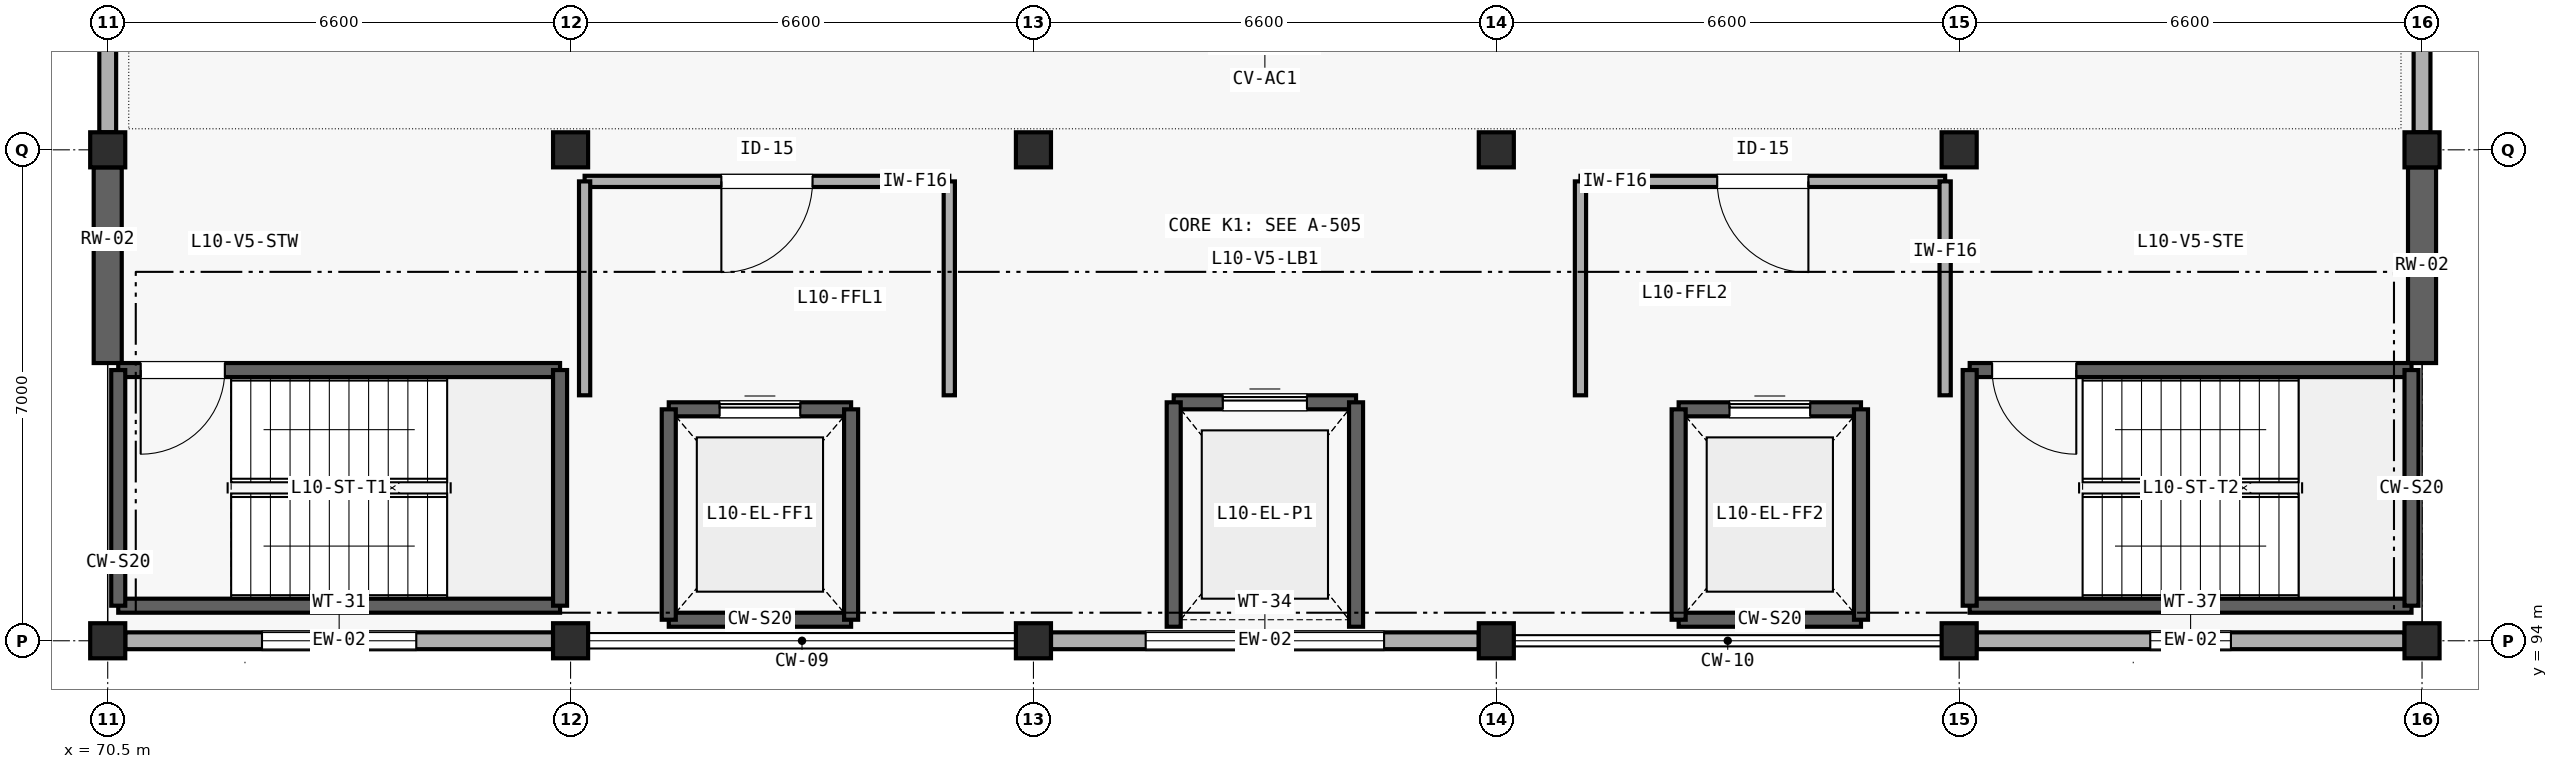
"""IFC4 building model, lengths in metres.
Left out: names, types, materials, properties, quantities, classifications, styles, units other than length and angle.
Written with IfcOpenShell. Run it as: python <this file> out.ifc"""

import sys

from ifc_helpers import new_model, si_unit, direction, frame, frame_2d, origin, origin_2d, place, context, subcontext, project, spatial, rectangle, extrude, element, fill, save


model = new_model("IFC4")
c1 = context("Model", 3, precision=1e-05, world=origin(), true_north=direction((0.0, 1.0)))
c2 = subcontext(c1, "Body", "Model", "MODEL_VIEW")
j1 = project(units=[si_unit("LENGTHUNIT", "METRE"), si_unit("PLANEANGLEUNIT", "RADIAN")], contexts=[c1])
p1 = place(None, origin())
s1 = spatial("IfcSite", under=j1, at=p1, CompositionType="ELEMENT")
p2 = place(p1, origin())
s2 = spatial("IfcBuilding", under=s1, at=p2, CompositionType="ELEMENT")
p3 = place(p2, frame((0.0, 0.0, 42.0)))
s3 = spatial("IfcBuildingStorey", under=s2, at=p3, CompositionType="ELEMENT", Elevation=42.0)
for number, where, z_axis, x_axis in (
    (1, (70.5, 94.0, 0.0), (0.0, 0.0, 1.0), (1.0, 0.0, 0.0)),
    (2, (70.5, 101.0, 0.0), (0.0, 0.0, 1.0), (1.0, 0.0, 0.0)),
    (3, (77.1, 94.0, 0.0), (0.0, 0.0, 1.0), (1.0, 0.0, 0.0)),
    (4, (77.1, 101.0, 0.0), (0.0, 0.0, 1.0), (1.0, 0.0, 0.0)),
    (5, (83.7, 94.0, 0.0), (0.0, 0.0, 1.0), (1.0, 0.0, 0.0)),
    (6, (83.7, 101.0, 0.0), (0.0, 0.0, 1.0), (1.0, 0.0, 0.0)),
    (7, (90.3, 94.0, 0.0), (0.0, 0.0, 1.0), (1.0, 0.0, 0.0)),
    (8, (90.3, 101.0, 0.0), (0.0, 0.0, 1.0), (1.0, 0.0, 0.0)),
    (9, (96.9, 94.0, 0.0), (0.0, 0.0, 1.0), (1.0, 0.0, 0.0)),
    (10, (96.9, 101.0, 0.0), (0.0, 0.0, 1.0), (1.0, 0.0, 0.0)),
    (11, (103.5, 94.0, 0.0), (0.0, 0.0, 1.0), (1.0, 0.0, 0.0)),
    (12, (103.5, 101.0, 0.0), (0.0, 0.0, 1.0), (1.0, 0.0, 0.0)),
):
    element("IfcColumn", number, at=place(p3, frame(where, z_axis=z_axis, x_axis=x_axis)), inside=s3, PredefinedType="COLUMN", context=c2, shape_type="SweptSolid", body=[
        extrude(rectangle(XDim=0.5, YDim=0.5, at=origin_2d()), origin(), (0.0, 0.0, 1.0), 4.2),
    ])
p4 = place(p3, frame((70.75, 94.0, 0.0), z_axis=(0.0, 0.0, 1.0), x_axis=(1.0, 0.0, 0.0)))
e13 = element("IfcWall", 13, at=p4, inside=s3, PredefinedType="SOLIDWALL", context=c2, shape_type="SweptSolid", body=[
    extrude(rectangle(XDim=6.1, YDim=0.24, at=frame_2d((3.05, 0.0))), origin(), (0.0, 0.0, 1.0), 3.365),
])
p5 = place(p4, frame((1.95, 0.0, 0.85)))
e14 = element("IfcOpeningElement", 14, at=p5, cuts=e13, PredefinedType="OPENING", context=c2, shape_type="SweptSolid", body=[
    extrude(rectangle(XDim=2.2, YDim=1.2, at=frame_2d((1.1, 0.6))), frame((0.0, 0.13, 0.0), z_axis=(0.0, -1.0, 0.0), x_axis=(1.0, 0.0, 0.0)), (0.0, 0.0, 1.0), 0.26),
])
p6 = place(p3, frame((83.95, 94.0, 0.0), z_axis=(0.0, 0.0, 1.0), x_axis=(1.0, 0.0, 0.0)))
e15 = element("IfcWall", 15, at=p6, inside=s3, PredefinedType="SOLIDWALL", context=c2, shape_type="SweptSolid", body=[
    extrude(rectangle(XDim=6.1, YDim=0.24, at=frame_2d((3.05, 0.0))), origin(), (0.0, 0.0, 1.0), 3.345),
])
p7 = place(p6, frame((1.35, 0.0, 0.85)))
e16 = element("IfcOpeningElement", 16, at=p7, cuts=e15, PredefinedType="OPENING", context=c2, shape_type="SweptSolid", body=[
    extrude(rectangle(XDim=3.4, YDim=1.2, at=frame_2d((1.7, 0.6))), frame((0.0, 0.13, 0.0), z_axis=(0.0, -1.0, 0.0), x_axis=(1.0, 0.0, 0.0)), (0.0, 0.0, 1.0), 0.26),
])
p8 = place(p3, frame((97.15, 94.0, 0.0), z_axis=(0.0, 0.0, 1.0), x_axis=(1.0, 0.0, 0.0)))
e17 = element("IfcWall", 17, at=p8, inside=s3, PredefinedType="SOLIDWALL", context=c2, shape_type="SweptSolid", body=[
    extrude(rectangle(XDim=6.1, YDim=0.24, at=frame_2d((3.05, 0.0))), origin(), (0.0, 0.0, 1.0), 3.135),
])
p9 = place(p8, frame((2.475, 0.0, 0.85)))
e18 = element("IfcOpeningElement", 18, at=p9, cuts=e17, PredefinedType="OPENING", context=c2, shape_type="SweptSolid", body=[
    extrude(rectangle(XDim=1.15, YDim=1.55, at=frame_2d((0.575, 0.775))), frame((0.0, 0.13, 0.0), z_axis=(0.0, -1.0, 0.0), x_axis=(1.0, 0.0, 0.0)), (0.0, 0.0, 1.0), 0.26),
])
p10 = place(p3, frame((70.5, 97.96, 0.0), z_axis=(0.0, 0.0, 1.0), x_axis=(0.0, 1.0, 0.0)))
e19 = element("IfcWall", 19, at=p10, inside=s3, PredefinedType="SHEAR", context=c2, shape_type="SweptSolid", body=[
    extrude(rectangle(XDim=2.79, YDim=0.4, at=frame_2d((1.395, 0.0))), origin(), (0.0, 0.0, 1.0), 3.85),
])
p11 = place(p3, frame((70.5, 101.25, 0.0), z_axis=(0.0, 0.0, 1.0), x_axis=(0.0, 1.0, 0.0)))
e20 = element("IfcWall", 20, at=p11, inside=s3, PredefinedType="SOLIDWALL", context=c2, shape_type="SweptSolid", body=[
    extrude(rectangle(XDim=6.5, YDim=0.24, at=frame_2d((3.25, 0.0))), origin(), (0.0, 0.0, 1.0), 3.565),
])
p12 = place(p11, frame((2.05, 0.0, 0.85)))
e21 = element("IfcOpeningElement", 21, at=p12, cuts=e20, PredefinedType="OPENING", context=c2, shape_type="SweptSolid", body=[
    extrude(rectangle(XDim=2.4, YDim=1.35, at=frame_2d((1.2, 0.675))), frame((0.0, 0.13, 0.0), z_axis=(0.0, -1.0, 0.0), x_axis=(1.0, 0.0, 0.0)), (0.0, 0.0, 1.0), 0.26),
])
p13 = place(p3, frame((103.5, 97.96, 0.0), z_axis=(0.0, 0.0, 1.0), x_axis=(0.0, 1.0, 0.0)))
e22 = element("IfcWall", 22, at=p13, inside=s3, PredefinedType="SHEAR", context=c2, shape_type="SweptSolid", body=[
    extrude(rectangle(XDim=2.79, YDim=0.4, at=frame_2d((1.395, 0.0))), origin(), (0.0, 0.0, 1.0), 3.85),
])
p14 = place(p3, frame((103.5, 101.25, 0.0), z_axis=(0.0, 0.0, 1.0), x_axis=(0.0, 1.0, 0.0)))
e23 = element("IfcWall", 23, at=p14, inside=s3, PredefinedType="SOLIDWALL", context=c2, shape_type="SweptSolid", body=[
    extrude(rectangle(XDim=6.5, YDim=0.24, at=frame_2d((3.25, 0.0))), origin(), (0.0, 0.0, 1.0), 3.505),
])
p15 = place(p14, frame((2.05, 0.0, 0.85)))
e24 = element("IfcOpeningElement", 24, at=p15, cuts=e23, PredefinedType="OPENING", context=c2, shape_type="SweptSolid", body=[
    extrude(rectangle(XDim=2.4, YDim=1.5, at=frame_2d((1.2, 0.75))), frame((0.0, 0.13, 0.0), z_axis=(0.0, -1.0, 0.0), x_axis=(1.0, 0.0, 0.0)), (0.0, 0.0, 1.0), 0.26),
])
p16 = place(p3, frame((70.65, 94.5, 0.0), z_axis=(0.0, 0.0, 1.0), x_axis=(1.0, 0.0, 0.0)))
e25 = element("IfcWall", 25, at=p16, inside=s3, PredefinedType="SHEAR", context=c2, shape_type="SweptSolid", body=[
    extrude(rectangle(XDim=6.3, YDim=0.2, at=frame_2d((3.15, 0.0))), origin(), (0.0, 0.0, 1.0), 4.2),
])
p17 = place(p3, frame((70.65, 97.86, 0.0), z_axis=(0.0, 0.0, 1.0), x_axis=(1.0, 0.0, 0.0)))
e26 = element("IfcWall", 26, at=p17, inside=s3, PredefinedType="SHEAR", context=c2, shape_type="SweptSolid", body=[
    extrude(rectangle(XDim=6.3, YDim=0.2, at=frame_2d((3.15, 0.0))), origin(), (0.0, 0.0, 1.0), 4.2),
])
p18 = place(p17, frame((0.32, 0.0, 0.0)))
e27 = element("IfcOpeningElement", 27, at=p18, cuts=e26, PredefinedType="OPENING", context=c2, shape_type="SweptSolid", body=[
    extrude(rectangle(XDim=1.2, YDim=2.15, at=frame_2d((0.6, 1.075))), frame((0.0, 0.11, 0.0), z_axis=(0.0, -1.0, 0.0), x_axis=(1.0, 0.0, 0.0)), (0.0, 0.0, 1.0), 0.22),
])
for number, where, z_axis, x_axis in (
    (28, (70.65, 94.5, 0.0), (0.0, 0.0, 1.0), (0.0, 1.0, 0.0)),
    (29, (76.95, 94.5, 0.0), (0.0, 0.0, 1.0), (0.0, 1.0, 0.0)),
):
    element("IfcWall", number, at=place(p3, frame(where, z_axis=z_axis, x_axis=x_axis)), inside=s3, PredefinedType="SHEAR", context=c2, shape_type="SweptSolid", body=[
        extrude(rectangle(XDim=3.36, YDim=0.2, at=frame_2d((1.68, 0.0))), origin(), (0.0, 0.0, 1.0), 4.2),
    ])
p19 = place(p3, frame((97.05, 94.5, 0.0), z_axis=(0.0, 0.0, 1.0), x_axis=(1.0, 0.0, 0.0)))
e30 = element("IfcWall", 30, at=p19, inside=s3, PredefinedType="SHEAR", context=c2, shape_type="SweptSolid", body=[
    extrude(rectangle(XDim=6.3, YDim=0.2, at=frame_2d((3.15, 0.0))), origin(), (0.0, 0.0, 1.0), 4.2),
])
p20 = place(p3, frame((97.05, 97.86, 0.0), z_axis=(0.0, 0.0, 1.0), x_axis=(1.0, 0.0, 0.0)))
e31 = element("IfcWall", 31, at=p20, inside=s3, PredefinedType="SHEAR", context=c2, shape_type="SweptSolid", body=[
    extrude(rectangle(XDim=6.3, YDim=0.2, at=frame_2d((3.15, 0.0))), origin(), (0.0, 0.0, 1.0), 4.2),
])
p21 = place(p20, frame((0.32, 0.0, 0.0)))
e32 = element("IfcOpeningElement", 32, at=p21, cuts=e31, PredefinedType="OPENING", context=c2, shape_type="SweptSolid", body=[
    extrude(rectangle(XDim=1.2, YDim=2.15, at=frame_2d((0.6, 1.075))), frame((0.0, 0.11, 0.0), z_axis=(0.0, -1.0, 0.0), x_axis=(1.0, 0.0, 0.0)), (0.0, 0.0, 1.0), 0.22),
])
for number, where, z_axis, x_axis in (
    (33, (97.05, 94.5, 0.0), (0.0, 0.0, 1.0), (0.0, 1.0, 0.0)),
    (34, (103.35, 94.5, 0.0), (0.0, 0.0, 1.0), (0.0, 1.0, 0.0)),
):
    element("IfcWall", number, at=place(p3, frame(where, z_axis=z_axis, x_axis=x_axis)), inside=s3, PredefinedType="SHEAR", context=c2, shape_type="SweptSolid", body=[
        extrude(rectangle(XDim=3.36, YDim=0.2, at=frame_2d((1.68, 0.0))), origin(), (0.0, 0.0, 1.0), 4.2),
    ])
p22 = place(p3, frame((78.5, 94.3, 0.0), z_axis=(0.0, 0.0, 1.0), x_axis=(1.0, 0.0, 0.0)))
e35 = element("IfcWall", 35, at=p22, inside=s3, PredefinedType="SHEAR", context=c2, shape_type="SweptSolid", body=[
    extrude(rectangle(XDim=2.6, YDim=0.2, at=frame_2d((1.3, 0.0))), origin(), (0.0, 0.0, 1.0), 4.2),
])
p23 = place(p3, frame((78.5, 97.3, 0.0), z_axis=(0.0, 0.0, 1.0), x_axis=(1.0, 0.0, 0.0)))
e36 = element("IfcWall", 36, at=p23, inside=s3, PredefinedType="SHEAR", context=c2, shape_type="SweptSolid", body=[
    extrude(rectangle(XDim=2.6, YDim=0.2, at=frame_2d((1.3, 0.0))), origin(), (0.0, 0.0, 1.0), 4.2),
])
p24 = place(p23, frame((0.725, 0.0, 0.0)))
e37 = element("IfcOpeningElement", 37, at=p24, cuts=e36, PredefinedType="OPENING", context=c2, shape_type="SweptSolid", body=[
    extrude(rectangle(XDim=1.15, YDim=2.2, at=frame_2d((0.575, 1.1))), frame((0.0, 0.11, 0.0), z_axis=(0.0, -1.0, 0.0), x_axis=(1.0, 0.0, 0.0)), (0.0, 0.0, 1.0), 0.22),
])
for number, where, z_axis, x_axis in (
    (38, (78.5, 94.3, 0.0), (0.0, 0.0, 1.0), (0.0, 1.0, 0.0)),
    (39, (81.1, 94.3, 0.0), (0.0, 0.0, 1.0), (0.0, 1.0, 0.0)),
):
    element("IfcWall", number, at=place(p3, frame(where, z_axis=z_axis, x_axis=x_axis)), inside=s3, PredefinedType="SHEAR", context=c2, shape_type="SweptSolid", body=[
        extrude(rectangle(XDim=3.0, YDim=0.2, at=frame_2d((1.5, 0.0))), origin(), (0.0, 0.0, 1.0), 4.2),
    ])
p25 = place(p3, frame((92.9, 94.3, 0.0), z_axis=(0.0, 0.0, 1.0), x_axis=(1.0, 0.0, 0.0)))
e40 = element("IfcWall", 40, at=p25, inside=s3, PredefinedType="SHEAR", context=c2, shape_type="SweptSolid", body=[
    extrude(rectangle(XDim=2.6, YDim=0.2, at=frame_2d((1.3, 0.0))), origin(), (0.0, 0.0, 1.0), 4.2),
])
p26 = place(p3, frame((92.9, 97.3, 0.0), z_axis=(0.0, 0.0, 1.0), x_axis=(1.0, 0.0, 0.0)))
e41 = element("IfcWall", 41, at=p26, inside=s3, PredefinedType="SHEAR", context=c2, shape_type="SweptSolid", body=[
    extrude(rectangle(XDim=2.6, YDim=0.2, at=frame_2d((1.3, 0.0))), origin(), (0.0, 0.0, 1.0), 4.2),
])
p27 = place(p26, frame((0.725, 0.0, 0.0)))
e42 = element("IfcOpeningElement", 42, at=p27, cuts=e41, PredefinedType="OPENING", context=c2, shape_type="SweptSolid", body=[
    extrude(rectangle(XDim=1.15, YDim=2.2, at=frame_2d((0.575, 1.1))), frame((0.0, 0.11, 0.0), z_axis=(0.0, -1.0, 0.0), x_axis=(1.0, 0.0, 0.0)), (0.0, 0.0, 1.0), 0.22),
])
for number, where, z_axis, x_axis in (
    (43, (92.9, 94.3, 0.0), (0.0, 0.0, 1.0), (0.0, 1.0, 0.0)),
    (44, (95.5, 94.3, 0.0), (0.0, 0.0, 1.0), (0.0, 1.0, 0.0)),
):
    element("IfcWall", number, at=place(p3, frame(where, z_axis=z_axis, x_axis=x_axis)), inside=s3, PredefinedType="SHEAR", context=c2, shape_type="SweptSolid", body=[
        extrude(rectangle(XDim=3.0, YDim=0.2, at=frame_2d((1.5, 0.0))), origin(), (0.0, 0.0, 1.0), 4.2),
    ])
p28 = place(p3, frame((85.7, 97.4, 0.0), z_axis=(0.0, 0.0, 1.0), x_axis=(1.0, 0.0, 0.0)))
e45 = element("IfcWall", 45, at=p28, inside=s3, PredefinedType="SHEAR", context=c2, shape_type="SweptSolid", body=[
    extrude(rectangle(XDim=2.6, YDim=0.2, at=frame_2d((1.3, 0.0))), origin(), (0.0, 0.0, 1.0), 4.2),
])
p29 = place(p28, frame((0.7, 0.0, 0.0)))
e46 = element("IfcOpeningElement", 46, at=p29, cuts=e45, PredefinedType="OPENING", context=c2, shape_type="SweptSolid", body=[
    extrude(rectangle(XDim=1.2, YDim=2.2, at=frame_2d((0.6, 1.1))), frame((0.0, 0.11, 0.0), z_axis=(0.0, -1.0, 0.0), x_axis=(1.0, 0.0, 0.0)), (0.0, 0.0, 1.0), 0.22),
])
for number, where, z_axis, x_axis in (
    (47, (85.7, 94.2, 0.0), (0.0, 0.0, 1.0), (0.0, 1.0, 0.0)),
    (48, (88.3, 94.2, 0.0), (0.0, 0.0, 1.0), (0.0, 1.0, 0.0)),
):
    element("IfcWall", number, at=place(p3, frame(where, z_axis=z_axis, x_axis=x_axis)), inside=s3, PredefinedType="SHEAR", context=c2, shape_type="SweptSolid", body=[
        extrude(rectangle(XDim=3.2, YDim=0.2, at=frame_2d((1.6, 0.0))), origin(), (0.0, 0.0, 1.0), 4.2),
    ])
p30 = place(p3, frame((77.3, 100.55, 0.0), z_axis=(0.0, 0.0, 1.0), x_axis=(1.0, 0.0, 0.0)))
e49 = element("IfcWall", 49, at=p30, inside=s3, PredefinedType="SOLIDWALL", context=c2, shape_type="SweptSolid", body=[
    extrude(rectangle(XDim=5.2, YDim=0.16, at=frame_2d((2.6, 0.0))), origin(), (0.0, 0.0, 1.0), 3.9),
])
p31 = place(p30, frame((1.95, 0.0, 0.0)))
e50 = element("IfcOpeningElement", 50, at=p31, cuts=e49, PredefinedType="OPENING", context=c2, shape_type="SweptSolid", body=[
    extrude(rectangle(XDim=1.3, YDim=2.15, at=frame_2d((0.65, 1.075))), frame((0.0, 0.09, 0.0), z_axis=(0.0, -1.0, 0.0), x_axis=(1.0, 0.0, 0.0)), (0.0, 0.0, 1.0), 0.18),
])
p32 = place(p3, frame((77.3, 97.5, 0.0), z_axis=(0.0, 0.0, 1.0), x_axis=(0.0, 1.0, 0.0)))
e51 = element("IfcWall", 51, at=p32, inside=s3, PredefinedType="SOLIDWALL", context=c2, shape_type="SweptSolid", body=[
    extrude(rectangle(XDim=3.05, YDim=0.16, at=frame_2d((1.525, 0.0))), origin(), (0.0, 0.0, 1.0), 3.405),
])
p33 = place(p3, frame((82.5, 97.5, 0.0), z_axis=(0.0, 0.0, 1.0), x_axis=(0.0, 1.0, 0.0)))
e52 = element("IfcWall", 52, at=p33, inside=s3, PredefinedType="SOLIDWALL", context=c2, shape_type="SweptSolid", body=[
    extrude(rectangle(XDim=3.05, YDim=0.16, at=frame_2d((1.525, 0.0))), origin(), (0.0, 0.0, 1.0), 3.9),
])
p34 = place(p3, frame((91.5, 100.55, 0.0), z_axis=(0.0, 0.0, 1.0), x_axis=(1.0, 0.0, 0.0)))
e53 = element("IfcWall", 53, at=p34, inside=s3, PredefinedType="SOLIDWALL", context=c2, shape_type="SweptSolid", body=[
    extrude(rectangle(XDim=5.2, YDim=0.16, at=frame_2d((2.6, 0.0))), origin(), (0.0, 0.0, 1.0), 3.9),
])
p35 = place(p34, frame((1.95, 0.0, 0.0)))
e54 = element("IfcOpeningElement", 54, at=p35, cuts=e53, PredefinedType="OPENING", context=c2, shape_type="SweptSolid", body=[
    extrude(rectangle(XDim=1.3, YDim=2.15, at=frame_2d((0.65, 1.075))), frame((0.0, 0.09, 0.0), z_axis=(0.0, -1.0, 0.0), x_axis=(1.0, 0.0, 0.0)), (0.0, 0.0, 1.0), 0.18),
])
p36 = place(p3, frame((91.5, 97.5, 0.0), z_axis=(0.0, 0.0, 1.0), x_axis=(0.0, 1.0, 0.0)))
e55 = element("IfcWall", 55, at=p36, inside=s3, PredefinedType="SOLIDWALL", context=c2, shape_type="SweptSolid", body=[
    extrude(rectangle(XDim=3.05, YDim=0.16, at=frame_2d((1.525, 0.0))), origin(), (0.0, 0.0, 1.0), 3.9),
])
p37 = place(p3, frame((96.7, 97.5, 0.0), z_axis=(0.0, 0.0, 1.0), x_axis=(0.0, 1.0, 0.0)))
e56 = element("IfcWall", 56, at=p37, inside=s3, PredefinedType="SOLIDWALL", context=c2, shape_type="SweptSolid", body=[
    extrude(rectangle(XDim=3.05, YDim=0.16, at=frame_2d((1.525, 0.0))), origin(), (0.0, 0.0, 1.0), 3.405),
])
p38 = place(p5, origin())
e57 = element("IfcWindow", 57, at=p38, inside=s3, PartitioningType="SINGLE_PANEL", PredefinedType="WINDOW", context=c2, shape_type="SweptSolid", body=[
    extrude(rectangle(XDim=2.2, YDim=1.2, at=frame_2d((1.1, 0.6))), frame((0.0, 0.03, 0.0), z_axis=(0.0, -1.0, 0.0), x_axis=(1.0, 0.0, 0.0)), (0.0, 0.0, 1.0), 0.06),
])
fill(e14, e57)
p39 = place(p7, origin())
e58 = element("IfcWindow", 58, at=p39, inside=s3, PartitioningType="SINGLE_PANEL", PredefinedType="WINDOW", context=c2, shape_type="SweptSolid", body=[
    extrude(rectangle(XDim=3.4, YDim=1.2, at=frame_2d((1.7, 0.6))), frame((0.0, 0.03, 0.0), z_axis=(0.0, -1.0, 0.0), x_axis=(1.0, 0.0, 0.0)), (0.0, 0.0, 1.0), 0.06),
])
fill(e16, e58)
p40 = place(p9, origin())
e59 = element("IfcWindow", 59, at=p40, inside=s3, PartitioningType="SINGLE_PANEL", PredefinedType="WINDOW", context=c2, shape_type="SweptSolid", body=[
    extrude(rectangle(XDim=1.15, YDim=1.55, at=frame_2d((0.575, 0.775))), frame((0.0, 0.03, 0.0), z_axis=(0.0, -1.0, 0.0), x_axis=(1.0, 0.0, 0.0)), (0.0, 0.0, 1.0), 0.06),
])
fill(e18, e59)
p41 = place(p18, frame((1.2, 0.0, 0.0), z_axis=(0.0, 0.0, 1.0), x_axis=(-1.0, 0.0, 0.0)))
e60 = element("IfcDoor", 60, at=p41, inside=s3, OperationType="SINGLE_SWING_RIGHT", PredefinedType="DOOR", context=c2, shape_type="SweptSolid", body=[
    extrude(rectangle(XDim=1.2, YDim=2.15, at=frame_2d((0.6, 1.075))), frame((0.0, 0.025, 0.0), z_axis=(0.0, -1.0, 0.0), x_axis=(1.0, 0.0, 0.0)), (0.0, 0.0, 1.0), 0.05),
])
fill(e27, e60)
p42 = place(p21, frame((1.2, 0.0, 0.0), z_axis=(0.0, 0.0, 1.0), x_axis=(-1.0, 0.0, 0.0)))
e61 = element("IfcDoor", 61, at=p42, inside=s3, OperationType="SINGLE_SWING_LEFT", PredefinedType="DOOR", context=c2, shape_type="SweptSolid", body=[
    extrude(rectangle(XDim=1.2, YDim=2.15, at=frame_2d((0.6, 1.075))), frame((0.0, 0.025, 0.0), z_axis=(0.0, -1.0, 0.0), x_axis=(1.0, 0.0, 0.0)), (0.0, 0.0, 1.0), 0.05),
])
fill(e32, e61)
p43 = place(p24, origin())
e62 = element("IfcDoor", 62, at=p43, inside=s3, OperationType="SLIDING_TO_LEFT", PredefinedType="DOOR", context=c2, shape_type="SweptSolid", body=[
    extrude(rectangle(XDim=1.15, YDim=2.2, at=frame_2d((0.575, 1.1))), frame((0.0, 0.025, 0.0), z_axis=(0.0, -1.0, 0.0), x_axis=(1.0, 0.0, 0.0)), (0.0, 0.0, 1.0), 0.05),
])
fill(e37, e62)
p44 = place(p27, origin())
e63 = element("IfcDoor", 63, at=p44, inside=s3, OperationType="SLIDING_TO_LEFT", PredefinedType="DOOR", context=c2, shape_type="SweptSolid", body=[
    extrude(rectangle(XDim=1.15, YDim=2.2, at=frame_2d((0.575, 1.1))), frame((0.0, 0.025, 0.0), z_axis=(0.0, -1.0, 0.0), x_axis=(1.0, 0.0, 0.0)), (0.0, 0.0, 1.0), 0.05),
])
fill(e42, e63)
p45 = place(p29, origin())
e64 = element("IfcDoor", 64, at=p45, inside=s3, OperationType="SLIDING_TO_LEFT", PredefinedType="DOOR", context=c2, shape_type="SweptSolid", body=[
    extrude(rectangle(XDim=1.2, YDim=2.2, at=frame_2d((0.6, 1.1))), frame((0.0, 0.025, 0.0), z_axis=(0.0, -1.0, 0.0), x_axis=(1.0, 0.0, 0.0)), (0.0, 0.0, 1.0), 0.05),
])
fill(e46, e64)
p46 = place(p31, frame((1.3, 0.0, 0.0), z_axis=(0.0, 0.0, 1.0), x_axis=(-1.0, 0.0, 0.0)))
e65 = element("IfcDoor", 65, at=p46, inside=s3, OperationType="SINGLE_SWING_RIGHT", PredefinedType="DOOR", context=c2, shape_type="SweptSolid", body=[
    extrude(rectangle(XDim=1.3, YDim=2.15, at=frame_2d((0.65, 1.075))), frame((0.0, 0.025, 0.0), z_axis=(0.0, -1.0, 0.0), x_axis=(1.0, 0.0, 0.0)), (0.0, 0.0, 1.0), 0.05),
])
fill(e50, e65)
p47 = place(p35, frame((1.3, 0.0, 0.0), z_axis=(0.0, 0.0, 1.0), x_axis=(-1.0, 0.0, 0.0)))
e66 = element("IfcDoor", 66, at=p47, inside=s3, OperationType="SINGLE_SWING_LEFT", PredefinedType="DOOR", context=c2, shape_type="SweptSolid", body=[
    extrude(rectangle(XDim=1.3, YDim=2.15, at=frame_2d((0.65, 1.075))), frame((0.0, 0.025, 0.0), z_axis=(0.0, -1.0, 0.0), x_axis=(1.0, 0.0, 0.0)), (0.0, 0.0, 1.0), 0.05),
])
fill(e54, e66)
save(model, sys.argv[1])
